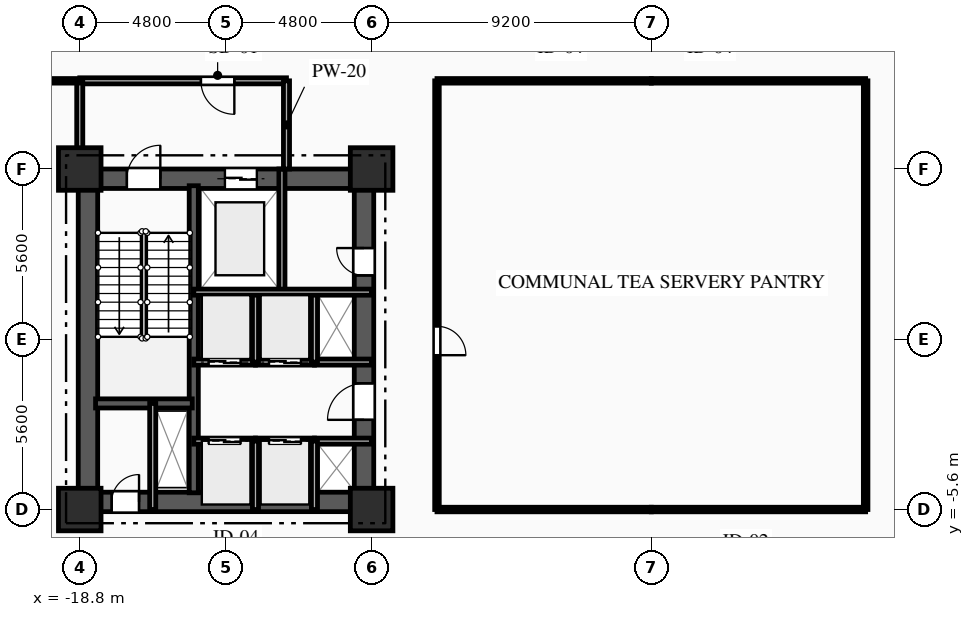
"""IFC4 building model, lengths in metres.
Left out: names, types, materials, properties, quantities, classifications, styles, units other than length and angle.
Written with IfcOpenShell. Run it as: python <this file> out.ifc"""

import sys

from ifc_helpers import new_model, si_unit, direction, frame, frame_2d, origin, origin_2d, place, context, subcontext, project, spatial, rectangle, extrude, element, fill, save


model = new_model("IFC4")
c1 = context("Model", 3, precision=1e-05, world=origin(), true_north=direction((0.0, 1.0)))
c2 = subcontext(c1, "Body", "Model", "MODEL_VIEW")
j1 = project(units=[si_unit("LENGTHUNIT", "METRE"), si_unit("PLANEANGLEUNIT", "RADIAN")], contexts=[c1])
p1 = place(None, origin())
s1 = spatial("IfcSite", under=j1, at=p1, CompositionType="ELEMENT")
p2 = place(p1, origin())
s2 = spatial("IfcBuilding", under=s1, at=p2, CompositionType="ELEMENT")
p3 = place(p2, frame((0.0, 0.0, 9.0)))
s3 = spatial("IfcBuildingStorey", under=s2, at=p3, CompositionType="ELEMENT", Elevation=9.0)
for number, where, z_axis, x_axis in (
    (1, (-18.8, -5.6, 0.0), (0.0, 0.0, 1.0), (1.0, 0.0, 0.0)),
    (2, (-18.8, 5.6, 0.0), (0.0, 0.0, 1.0), (1.0, 0.0, 0.0)),
    (3, (-9.2, -5.6, 0.0), (0.0, 0.0, 1.0), (1.0, 0.0, 0.0)),
    (4, (-9.2, 5.6, 0.0), (0.0, 0.0, 1.0), (1.0, 0.0, 0.0)),
):
    element("IfcColumn", number, at=place(p3, frame(where, z_axis=z_axis, x_axis=x_axis)), inside=s3, PredefinedType="COLUMN", context=c2, shape_type="SweptSolid", body=[
        extrude(rectangle(XDim=1.4, YDim=1.4, at=origin_2d()), origin(), (0.0, 0.0, 1.0), 4.5),
    ])
p4 = place(p3, frame((-18.8, 5.28, 0.0), z_axis=(0.0, 0.0, 1.0), x_axis=(1.0, 0.0, 0.0)))
e5 = element("IfcWall", 5, at=p4, inside=s3, PredefinedType="SHEAR", context=c2, shape_type="SweptSolid", body=[
    extrude(rectangle(XDim=9.6, YDim=0.64, at=frame_2d((4.8, 0.0))), origin(), (0.0, 0.0, 1.0), 4.17),
])
p5 = place(p4, frame((1.55, 0.0, 0.0)))
e6 = element("IfcOpeningElement", 6, at=p5, cuts=e5, PredefinedType="OPENING", context=c2, shape_type="SweptSolid", body=[
    extrude(rectangle(XDim=1.1, YDim=2.15, at=frame_2d((0.55, 1.075))), frame((0.0, 0.33, 0.0), z_axis=(0.0, -1.0, 0.0), x_axis=(1.0, 0.0, 0.0)), (0.0, 0.0, 1.0), 0.66),
])
p6 = place(p4, frame((4.775, 0.0, 0.0)))
e7 = element("IfcOpeningElement", 7, at=p6, cuts=e5, PredefinedType="OPENING", context=c2, shape_type="SweptSolid", body=[
    extrude(rectangle(XDim=1.05, YDim=2.1, at=frame_2d((0.525, 1.05))), frame((0.0, 0.33, 0.0), z_axis=(0.0, -1.0, 0.0), x_axis=(1.0, 0.0, 0.0)), (0.0, 0.0, 1.0), 0.66),
])
p7 = place(p3, frame((-18.8, -5.35, 0.0), z_axis=(0.0, 0.0, 1.0), x_axis=(1.0, 0.0, 0.0)))
e8 = element("IfcWall", 8, at=p7, inside=s3, PredefinedType="SHEAR", context=c2, shape_type="SweptSolid", body=[
    extrude(rectangle(XDim=9.6, YDim=0.64, at=frame_2d((4.8, 0.0))), origin(), (0.0, 0.0, 1.0), 4.17),
])
p8 = place(p7, frame((1.05, 0.0, 0.0)))
e9 = element("IfcOpeningElement", 9, at=p8, cuts=e8, PredefinedType="OPENING", context=c2, shape_type="SweptSolid", body=[
    extrude(rectangle(XDim=0.9, YDim=2.1, at=frame_2d((0.45, 1.05))), frame((0.0, 0.33, 0.0), z_axis=(0.0, -1.0, 0.0), x_axis=(1.0, 0.0, 0.0)), (0.0, 0.0, 1.0), 0.66),
])
p9 = place(p3, frame((-18.53, -5.05, 0.0), z_axis=(0.0, 0.0, 1.0), x_axis=(0.0, 1.0, 0.0)))
e10 = element("IfcWall", 10, at=p9, inside=s3, PredefinedType="SHEAR", context=c2, shape_type="SweptSolid", body=[
    extrude(rectangle(XDim=10.1, YDim=0.64, at=frame_2d((5.05, 0.0))), origin(), (0.0, 0.0, 1.0), 4.17),
])
p10 = place(p3, frame((-9.45, -5.05, 0.0), z_axis=(0.0, 0.0, 1.0), x_axis=(0.0, 1.0, 0.0)))
e11 = element("IfcWall", 11, at=p10, inside=s3, PredefinedType="SHEAR", context=c2, shape_type="SweptSolid", body=[
    extrude(rectangle(XDim=10.1, YDim=0.64, at=frame_2d((5.05, 0.0))), origin(), (0.0, 0.0, 1.0), 4.17),
])
p11 = place(p10, frame((7.15, 0.0, 0.0)))
e12 = element("IfcOpeningElement", 12, at=p11, cuts=e11, PredefinedType="OPENING", context=c2, shape_type="SweptSolid", body=[
    extrude(rectangle(XDim=0.9, YDim=2.1, at=frame_2d((0.45, 1.05))), frame((0.0, 0.33, 0.0), z_axis=(0.0, -1.0, 0.0), x_axis=(1.0, 0.0, 0.0)), (0.0, 0.0, 1.0), 0.66),
])
p12 = place(p10, frame((2.4, 0.0, 0.0)))
e13 = element("IfcOpeningElement", 13, at=p12, cuts=e11, PredefinedType="OPENING", context=c2, shape_type="SweptSolid", body=[
    extrude(rectangle(XDim=1.2, YDim=2.15, at=frame_2d((0.6, 1.075))), frame((0.0, 0.33, 0.0), z_axis=(0.0, -1.0, 0.0), x_axis=(1.0, 0.0, 0.0)), (0.0, 0.0, 1.0), 0.66),
])
p13 = place(p3, frame((-15.05, -5.05, 0.0), z_axis=(0.0, 0.0, 1.0), x_axis=(0.0, 1.0, 0.0)))
e14 = element("IfcWall", 14, at=p13, inside=s3, PredefinedType="SHEAR", context=c2, shape_type="SweptSolid", body=[
    extrude(rectangle(XDim=10.1, YDim=0.3, at=frame_2d((5.05, 0.0))), origin(), (0.0, 0.0, 1.0), 4.17),
])
p14 = place(p3, frame((-18.28, -2.11, 0.0), z_axis=(0.0, 0.0, 1.0), x_axis=(1.0, 0.0, 0.0)))
e15 = element("IfcWall", 15, at=p14, inside=s3, PredefinedType="SHEAR", context=c2, shape_type="SweptSolid", body=[
    extrude(rectangle(XDim=3.18, YDim=0.3, at=frame_2d((1.59, 0.0))), origin(), (0.0, 0.0, 1.0), 4.17),
])
p15 = place(p3, frame((-16.4, -5.6, 0.0), z_axis=(0.0, 0.0, 1.0), x_axis=(0.0, 1.0, 0.0)))
e16 = element("IfcWall", 16, at=p15, inside=s3, PredefinedType="PARTITIONING", context=c2, shape_type="SweptSolid", body=[
    extrude(rectangle(XDim=3.49, YDim=0.2, at=frame_2d((1.745, 0.0))), origin(), (0.0, 0.0, 1.0), 4.17),
])
p16 = place(p3, frame((-12.15, 1.55, 0.0), z_axis=(0.0, 0.0, 1.0), x_axis=(0.0, 1.0, 0.0)))
e17 = element("IfcWall", 17, at=p16, inside=s3, PredefinedType="PARTITIONING", context=c2, shape_type="SweptSolid", body=[
    extrude(rectangle(XDim=4.05, YDim=0.2, at=frame_2d((2.025, 0.0))), origin(), (0.0, 0.0, 1.0), 4.17),
])
p17 = place(p3, frame((-12.0, 8.5, 0.0), z_axis=(0.0, 0.0, 1.0), x_axis=(-1.0, 0.0, 0.0)))
e18 = element("IfcWall", 18, at=p17, inside=s3, PredefinedType="PARTITIONING", context=c2, shape_type="SweptSolid", body=[
    extrude(rectangle(XDim=6.8, YDim=0.2, at=frame_2d((3.4, 0.0))), origin(), (0.0, 0.0, 1.0), 4.17),
])
p18 = place(p17, frame((1.715, 0.0, 0.0)))
e19 = element("IfcOpeningElement", 19, at=p18, cuts=e18, PredefinedType="OPENING", context=c2, shape_type="SweptSolid", body=[
    extrude(rectangle(XDim=1.1, YDim=2.15, at=frame_2d((0.55, 1.075))), frame((0.0, 0.11, 0.0), z_axis=(0.0, -1.0, 0.0), x_axis=(1.0, 0.0, 0.0)), (0.0, 0.0, 1.0), 0.22),
])
p19 = place(p3, frame((-12.0, 5.6, 0.0), z_axis=(0.0, 0.0, 1.0), x_axis=(0.0, 1.0, 0.0)))
e20 = element("IfcWall", 20, at=p19, inside=s3, PredefinedType="PARTITIONING", context=c2, shape_type="SweptSolid", body=[
    extrude(rectangle(XDim=2.9, YDim=0.2, at=frame_2d((1.45, 0.0))), origin(), (0.0, 0.0, 1.0), 4.17),
])
p20 = place(p3, frame((-18.8, 8.5, 0.0), z_axis=(0.0, 0.0, 1.0), x_axis=(0.0, -1.0, 0.0)))
e21 = element("IfcWall", 21, at=p20, inside=s3, PredefinedType="PARTITIONING", context=c2, shape_type="SweptSolid", body=[
    extrude(rectangle(XDim=2.9, YDim=0.2, at=frame_2d((1.45, 0.0))), origin(), (0.0, 0.0, 1.0), 3.655),
])
p21 = place(p3, frame((-15.05, -3.35, 0.0), z_axis=(0.0, 0.0, 1.0), x_axis=(1.0, 0.0, 0.0)))
e22 = element("IfcWall", 22, at=p21, inside=s3, PredefinedType="PARTITIONING", context=c2, shape_type="SweptSolid", body=[
    extrude(rectangle(XDim=2.03, YDim=0.2, at=frame_2d((1.015, 0.0))), origin(), (0.0, 0.0, 1.0), 4.17),
])
p22 = place(p21, frame((0.49, 0.0, 0.0)))
e23 = element("IfcOpeningElement", 23, at=p22, cuts=e22, PredefinedType="OPENING", context=c2, shape_type="SweptSolid", body=[
    extrude(rectangle(XDim=1.05, YDim=2.1, at=frame_2d((0.525, 1.05))), frame((0.0, 0.11, 0.0), z_axis=(0.0, -1.0, 0.0), x_axis=(1.0, 0.0, 0.0)), (0.0, 0.0, 1.0), 0.22),
])
p23 = place(p3, frame((-13.02, -3.35, 0.0), z_axis=(0.0, 0.0, 1.0), x_axis=(1.0, 0.0, 0.0)))
e24 = element("IfcWall", 24, at=p23, inside=s3, PredefinedType="PARTITIONING", context=c2, shape_type="SweptSolid", body=[
    extrude(rectangle(XDim=1.94, YDim=0.2, at=frame_2d((0.97, 0.0))), origin(), (0.0, 0.0, 1.0), 4.17),
])
p24 = place(p23, frame((0.445, 0.0, 0.0)))
e25 = element("IfcOpeningElement", 25, at=p24, cuts=e24, PredefinedType="OPENING", context=c2, shape_type="SweptSolid", body=[
    extrude(rectangle(XDim=1.05, YDim=2.1, at=frame_2d((0.525, 1.05))), frame((0.0, 0.11, 0.0), z_axis=(0.0, -1.0, 0.0), x_axis=(1.0, 0.0, 0.0)), (0.0, 0.0, 1.0), 0.22),
])
p25 = place(p3, frame((-11.08, -3.35, 0.0), z_axis=(0.0, 0.0, 1.0), x_axis=(1.0, 0.0, 0.0)))
e26 = element("IfcWall", 26, at=p25, inside=s3, PredefinedType="PARTITIONING", context=c2, shape_type="SweptSolid", body=[
    extrude(rectangle(XDim=1.88, YDim=0.2, at=frame_2d((0.94, 0.0))), origin(), (0.0, 0.0, 1.0), 3.885),
])
p26 = place(p3, frame((-13.02, -0.75, 0.0), z_axis=(0.0, 0.0, 1.0), x_axis=(-1.0, 0.0, 0.0)))
e27 = element("IfcWall", 27, at=p26, inside=s3, PredefinedType="PARTITIONING", context=c2, shape_type="SweptSolid", body=[
    extrude(rectangle(XDim=2.03, YDim=0.2, at=frame_2d((1.015, 0.0))), origin(), (0.0, 0.0, 1.0), 4.17),
])
p27 = place(p26, frame((0.49, 0.0, 0.0)))
e28 = element("IfcOpeningElement", 28, at=p27, cuts=e27, PredefinedType="OPENING", context=c2, shape_type="SweptSolid", body=[
    extrude(rectangle(XDim=1.05, YDim=2.1, at=frame_2d((0.525, 1.05))), frame((0.0, 0.11, 0.0), z_axis=(0.0, -1.0, 0.0), x_axis=(1.0, 0.0, 0.0)), (0.0, 0.0, 1.0), 0.22),
])
p28 = place(p3, frame((-11.08, -0.75, 0.0), z_axis=(0.0, 0.0, 1.0), x_axis=(-1.0, 0.0, 0.0)))
e29 = element("IfcWall", 29, at=p28, inside=s3, PredefinedType="PARTITIONING", context=c2, shape_type="SweptSolid", body=[
    extrude(rectangle(XDim=1.94, YDim=0.2, at=frame_2d((0.97, 0.0))), origin(), (0.0, 0.0, 1.0), 4.17),
])
p29 = place(p28, frame((0.445, 0.0, 0.0)))
e30 = element("IfcOpeningElement", 30, at=p29, cuts=e29, PredefinedType="OPENING", context=c2, shape_type="SweptSolid", body=[
    extrude(rectangle(XDim=1.05, YDim=2.1, at=frame_2d((0.525, 1.05))), frame((0.0, 0.11, 0.0), z_axis=(0.0, -1.0, 0.0), x_axis=(1.0, 0.0, 0.0)), (0.0, 0.0, 1.0), 0.22),
])
p30 = place(p3, frame((-9.2, -0.75, 0.0), z_axis=(0.0, 0.0, 1.0), x_axis=(-1.0, 0.0, 0.0)))
e31 = element("IfcWall", 31, at=p30, inside=s3, PredefinedType="PARTITIONING", context=c2, shape_type="SweptSolid", body=[
    extrude(rectangle(XDim=1.88, YDim=0.2, at=frame_2d((0.94, 0.0))), origin(), (0.0, 0.0, 1.0), 4.17),
])
for number, where, z_axis, x_axis in (
    (32, (-13.02, -5.6, 0.0), (0.0, 0.0, 1.0), (0.0, 1.0, 0.0)),
    (33, (-11.08, -5.6, 0.0), (0.0, 0.0, 1.0), (0.0, 1.0, 0.0)),
):
    element("IfcWall", number, at=place(p3, frame(where, z_axis=z_axis, x_axis=x_axis)), inside=s3, PredefinedType="PARTITIONING", context=c2, shape_type="SweptSolid", body=[
        extrude(rectangle(XDim=2.25, YDim=0.2, at=frame_2d((1.125, 0.0))), origin(), (0.0, 0.0, 1.0), 4.17),
    ])
for number, where, z_axis, x_axis in (
    (34, (-13.02, -0.75, 0.0), (0.0, 0.0, 1.0), (0.0, 1.0, 0.0)),
    (35, (-11.08, -0.75, 0.0), (0.0, 0.0, 1.0), (0.0, 1.0, 0.0)),
):
    element("IfcWall", number, at=place(p3, frame(where, z_axis=z_axis, x_axis=x_axis)), inside=s3, PredefinedType="PARTITIONING", context=c2, shape_type="SweptSolid", body=[
        extrude(rectangle(XDim=2.3, YDim=0.2, at=frame_2d((1.15, 0.0))), origin(), (0.0, 0.0, 1.0), 4.17),
    ])
p31 = place(p3, frame((-18.8, 8.5, 0.0), z_axis=(0.0, 0.0, 1.0), x_axis=(-1.0, 0.0, 0.0)))
e36 = element("IfcWall", 36, at=p31, inside=s3, PredefinedType="PARTITIONING", context=c2, shape_type="SweptSolid", body=[
    extrude(rectangle(XDim=5.2, YDim=0.15, at=frame_2d((2.6, 0.0))), origin(), (0.0, 0.0, 1.0), 4.17),
])
p32 = place(p31, frame((2.89, 0.0, 0.0)))
e37 = element("IfcOpeningElement", 37, at=p32, cuts=e36, PredefinedType="OPENING", context=c2, shape_type="SweptSolid", body=[
    extrude(rectangle(XDim=1.4, YDim=2.3, at=frame_2d((0.7, 1.15))), frame((0.0, 0.085, 0.0), z_axis=(0.0, -1.0, 0.0), x_axis=(1.0, 0.0, 0.0)), (0.0, 0.0, 1.0), 0.17),
])
for number, where, z_axis, x_axis in (
    (38, (0.0, 8.5, 0.0), (0.0, 0.0, 1.0), (-1.0, 0.0, 0.0)),
    (39, (7.05, 8.5, 0.0), (0.0, 0.0, 1.0), (-1.0, 0.0, 0.0)),
):
    element("IfcWall", number, at=place(p3, frame(where, z_axis=z_axis, x_axis=x_axis)), inside=s3, PredefinedType="PARTITIONING", context=c2, shape_type="SweptSolid", body=[
        extrude(rectangle(XDim=7.05, YDim=0.15, at=frame_2d((3.525, 0.0))), origin(), (0.0, 0.0, 1.0), 4.17),
    ])
for number, where, z_axis, x_axis in (
    (40, (-7.05, -5.6, 0.0), (0.0, 0.0, 1.0), (1.0, 0.0, 0.0)),
    (41, (0.0, -5.6, 0.0), (0.0, 0.0, 1.0), (1.0, 0.0, 0.0)),
):
    element("IfcWall", number, at=place(p3, frame(where, z_axis=z_axis, x_axis=x_axis)), inside=s3, PredefinedType="PARTITIONING", context=c2, shape_type="SweptSolid", body=[
        extrude(rectangle(XDim=7.05, YDim=0.15, at=frame_2d((3.525, 0.0))), origin(), (0.0, 0.0, 1.0), 3.147),
    ])
p33 = place(p3, frame((-7.05, 8.5, 0.0), z_axis=(0.0, 0.0, 1.0), x_axis=(0.0, -1.0, 0.0)))
e42 = element("IfcWall", 42, at=p33, inside=s3, PredefinedType="PARTITIONING", context=c2, shape_type="SweptSolid", body=[
    extrude(rectangle(XDim=14.1, YDim=0.15, at=frame_2d((7.05, 0.0))), origin(), (0.0, 0.0, 1.0), 4.17),
])
p34 = place(p33, frame((8.074, 0.0, 0.0)))
e43 = element("IfcOpeningElement", 43, at=p34, cuts=e42, PredefinedType="OPENING", context=c2, shape_type="SweptSolid", body=[
    extrude(rectangle(XDim=0.95, YDim=2.1, at=frame_2d((0.475, 1.05))), frame((0.0, 0.085, 0.0), z_axis=(0.0, -1.0, 0.0), x_axis=(1.0, 0.0, 0.0)), (0.0, 0.0, 1.0), 0.17),
])
p35 = place(p3, frame((7.05, -5.6, 0.0), z_axis=(0.0, 0.0, 1.0), x_axis=(0.0, 1.0, 0.0)))
e44 = element("IfcWall", 44, at=p35, inside=s3, PredefinedType="PARTITIONING", context=c2, shape_type="SweptSolid", body=[
    extrude(rectangle(XDim=14.1, YDim=0.15, at=frame_2d((7.05, 0.0))), origin(), (0.0, 0.0, 1.0), 4.17),
])
p36 = place(p3, frame((-15.05, 1.55, 0.0), z_axis=(0.0, 0.0, 1.0), x_axis=(1.0, 0.0, 0.0)))
e45 = element("IfcWall", 45, at=p36, inside=s3, PredefinedType="PARTITIONING", context=c2, shape_type="SweptSolid", body=[
    extrude(rectangle(XDim=5.85, YDim=0.2, at=frame_2d((2.925, 0.0))), origin(), (0.0, 0.0, 1.0), 4.17),
])
p37 = place(p5, origin())
e46 = element("IfcDoor", 46, at=p37, inside=s3, OperationType="SINGLE_SWING_RIGHT", PredefinedType="DOOR", context=c2, shape_type="SweptSolid", body=[
    extrude(rectangle(XDim=1.1, YDim=2.15, at=frame_2d((0.55, 1.075))), frame((0.0, 0.025, 0.0), z_axis=(0.0, -1.0, 0.0), x_axis=(1.0, 0.0, 0.0)), (0.0, 0.0, 1.0), 0.05),
])
fill(e6, e46)
p38 = place(p6, origin())
e47 = element("IfcDoor", 47, at=p38, inside=s3, OperationType="DOUBLE_DOOR_SLIDING", PredefinedType="DOOR", context=c2, shape_type="SweptSolid", body=[
    extrude(rectangle(XDim=1.05, YDim=2.1, at=frame_2d((0.525, 1.05))), frame((0.0, 0.025, 0.0), z_axis=(0.0, -1.0, 0.0), x_axis=(1.0, 0.0, 0.0)), (0.0, 0.0, 1.0), 0.05),
])
fill(e7, e47)
p39 = place(p8, origin())
e48 = element("IfcDoor", 48, at=p39, inside=s3, OperationType="SINGLE_SWING_RIGHT", PredefinedType="DOOR", context=c2, shape_type="SweptSolid", body=[
    extrude(rectangle(XDim=0.9, YDim=2.1, at=frame_2d((0.45, 1.05))), frame((0.0, 0.025, 0.0), z_axis=(0.0, -1.0, 0.0), x_axis=(1.0, 0.0, 0.0)), (0.0, 0.0, 1.0), 0.05),
])
fill(e9, e48)
p40 = place(p18, origin())
e49 = element("IfcDoor", 49, at=p40, inside=s3, OperationType="SINGLE_SWING_LEFT", PredefinedType="DOOR", context=c2, shape_type="SweptSolid", body=[
    extrude(rectangle(XDim=1.1, YDim=2.15, at=frame_2d((0.55, 1.075))), frame((0.0, 0.025, 0.0), z_axis=(0.0, -1.0, 0.0), x_axis=(1.0, 0.0, 0.0)), (0.0, 0.0, 1.0), 0.05),
])
fill(e19, e49)
p41 = place(p11, origin())
e50 = element("IfcDoor", 50, at=p41, inside=s3, OperationType="SINGLE_SWING_RIGHT", PredefinedType="DOOR", context=c2, shape_type="SweptSolid", body=[
    extrude(rectangle(XDim=0.9, YDim=2.1, at=frame_2d((0.45, 1.05))), frame((0.0, 0.025, 0.0), z_axis=(0.0, -1.0, 0.0), x_axis=(1.0, 0.0, 0.0)), (0.0, 0.0, 1.0), 0.05),
])
fill(e12, e50)
p42 = place(p22, origin())
e51 = element("IfcDoor", 51, at=p42, inside=s3, OperationType="DOUBLE_DOOR_SLIDING", PredefinedType="DOOR", context=c2, shape_type="SweptSolid", body=[
    extrude(rectangle(XDim=1.05, YDim=2.1, at=frame_2d((0.525, 1.05))), frame((0.0, 0.025, 0.0), z_axis=(0.0, -1.0, 0.0), x_axis=(1.0, 0.0, 0.0)), (0.0, 0.0, 1.0), 0.05),
])
fill(e23, e51)
p43 = place(p24, origin())
e52 = element("IfcDoor", 52, at=p43, inside=s3, OperationType="DOUBLE_DOOR_SLIDING", PredefinedType="DOOR", context=c2, shape_type="SweptSolid", body=[
    extrude(rectangle(XDim=1.05, YDim=2.1, at=frame_2d((0.525, 1.05))), frame((0.0, 0.025, 0.0), z_axis=(0.0, -1.0, 0.0), x_axis=(1.0, 0.0, 0.0)), (0.0, 0.0, 1.0), 0.05),
])
fill(e25, e52)
p44 = place(p27, origin())
e53 = element("IfcDoor", 53, at=p44, inside=s3, OperationType="DOUBLE_DOOR_SLIDING", PredefinedType="DOOR", context=c2, shape_type="SweptSolid", body=[
    extrude(rectangle(XDim=1.05, YDim=2.1, at=frame_2d((0.525, 1.05))), frame((0.0, 0.025, 0.0), z_axis=(0.0, -1.0, 0.0), x_axis=(1.0, 0.0, 0.0)), (0.0, 0.0, 1.0), 0.05),
])
fill(e28, e53)
p45 = place(p29, origin())
e54 = element("IfcDoor", 54, at=p45, inside=s3, OperationType="DOUBLE_DOOR_SLIDING", PredefinedType="DOOR", context=c2, shape_type="SweptSolid", body=[
    extrude(rectangle(XDim=1.05, YDim=2.1, at=frame_2d((0.525, 1.05))), frame((0.0, 0.025, 0.0), z_axis=(0.0, -1.0, 0.0), x_axis=(1.0, 0.0, 0.0)), (0.0, 0.0, 1.0), 0.05),
])
fill(e30, e54)
p46 = place(p12, origin())
e55 = element("IfcDoor", 55, at=p46, inside=s3, OperationType="SINGLE_SWING_LEFT", PredefinedType="DOOR", context=c2, shape_type="SweptSolid", body=[
    extrude(rectangle(XDim=1.2, YDim=2.15, at=frame_2d((0.6, 1.075))), frame((0.0, 0.025, 0.0), z_axis=(0.0, -1.0, 0.0), x_axis=(1.0, 0.0, 0.0)), (0.0, 0.0, 1.0), 0.05),
])
fill(e13, e55)
p47 = place(p34, origin())
e56 = element("IfcDoor", 56, at=p47, inside=s3, OperationType="SINGLE_SWING_RIGHT", PredefinedType="DOOR", context=c2, shape_type="SweptSolid", body=[
    extrude(rectangle(XDim=0.95, YDim=2.1, at=frame_2d((0.475, 1.05))), frame((0.0, 0.025, 0.0), z_axis=(0.0, -1.0, 0.0), x_axis=(1.0, 0.0, 0.0)), (0.0, 0.0, 1.0), 0.05),
])
fill(e43, e56)
save(model, sys.argv[1])
